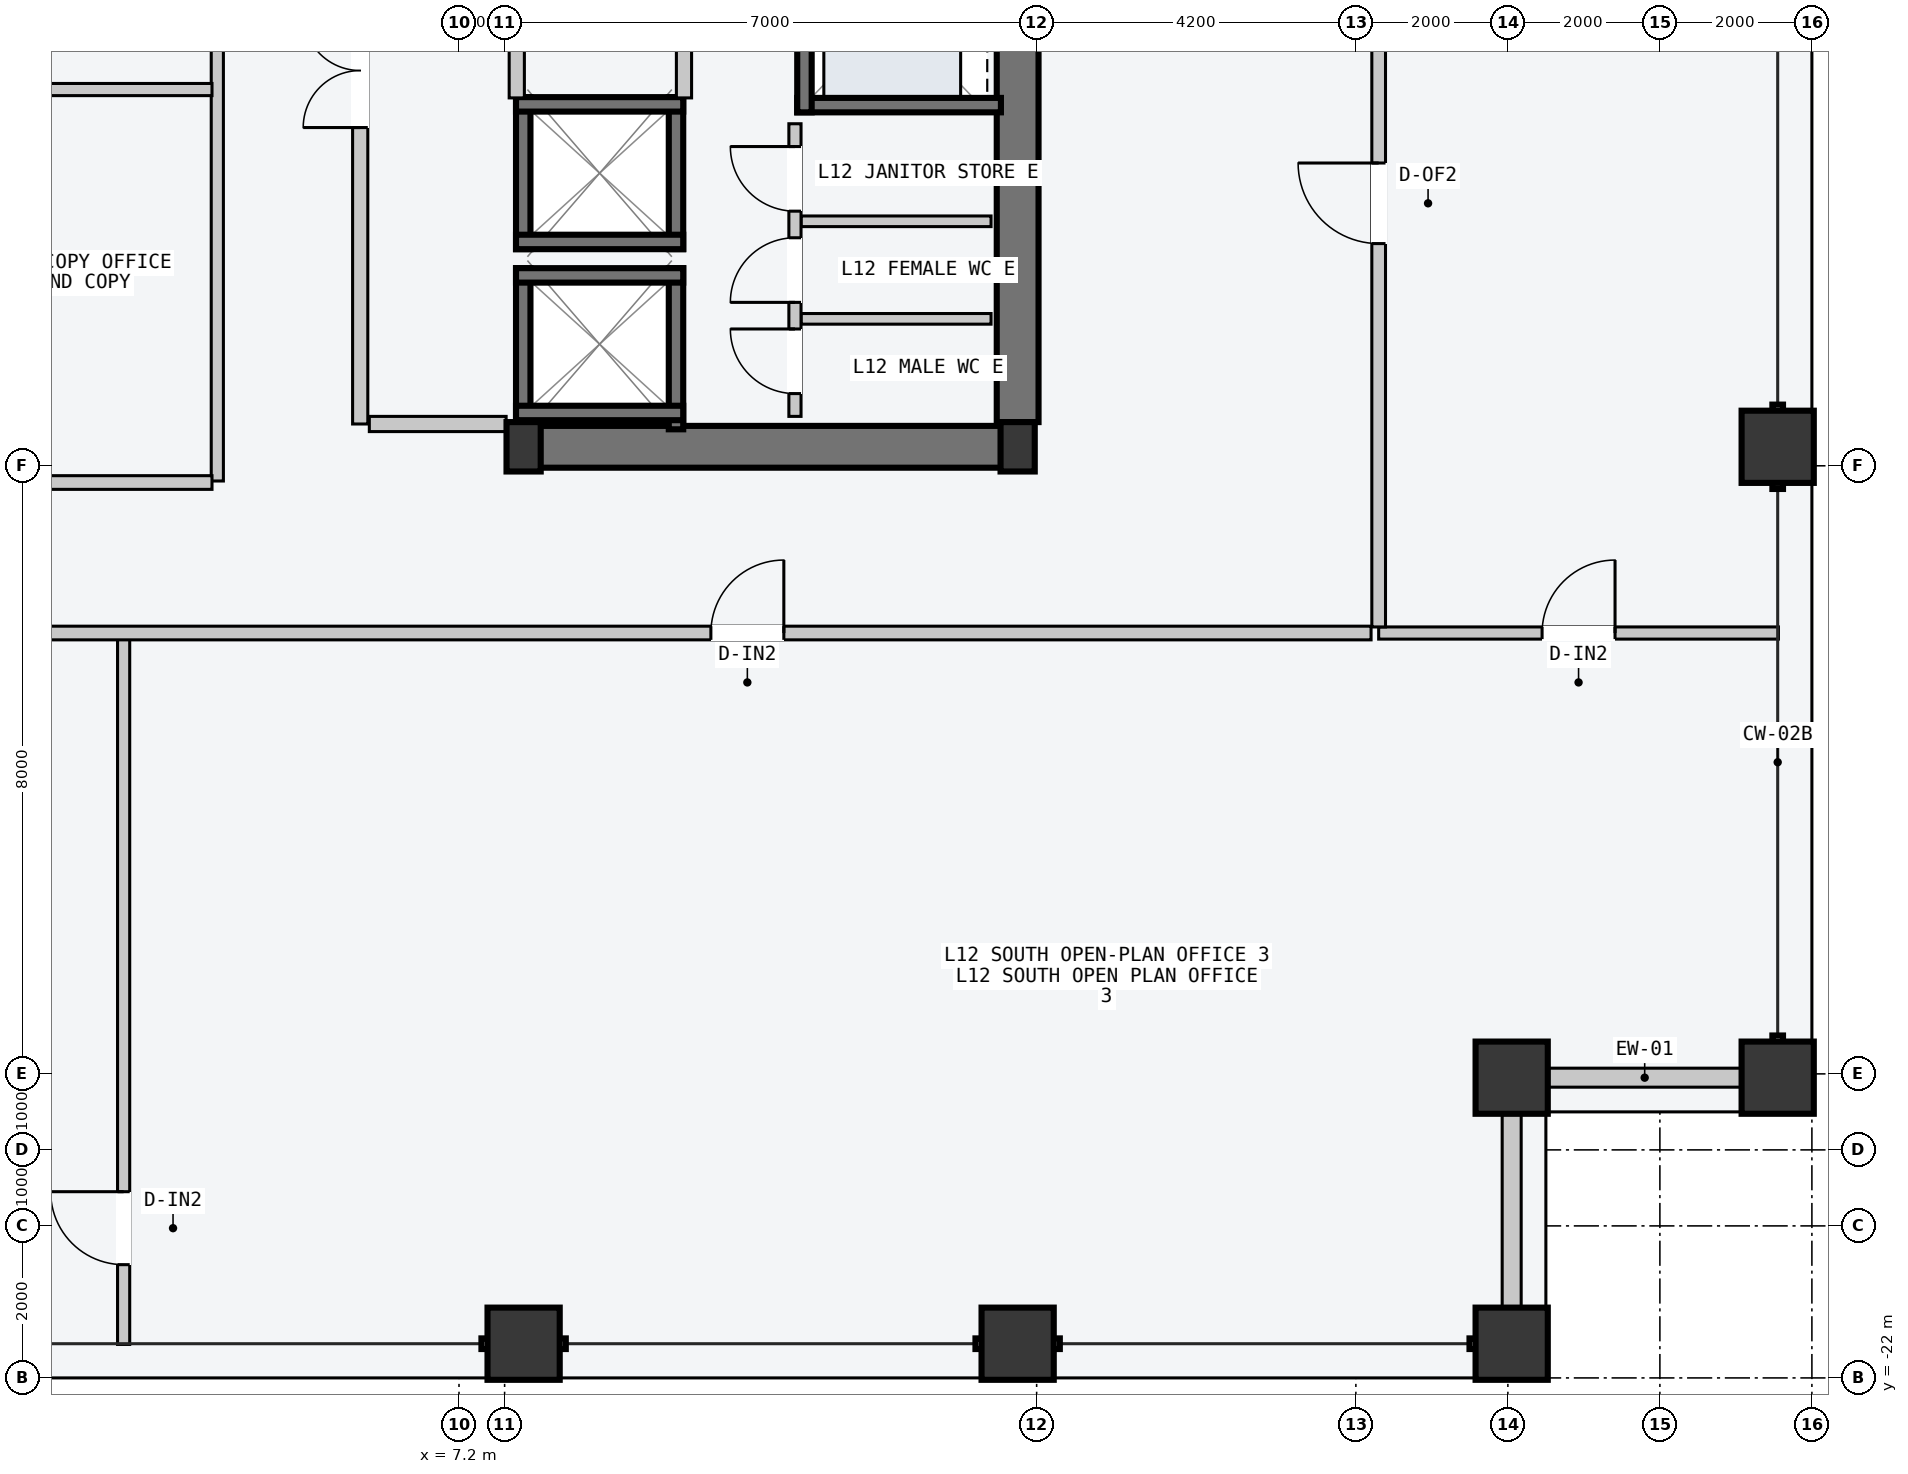
"""IFC4 building model, lengths in metres.
Left out: names, types, materials, properties, quantities, classifications, styles, units other than length and angle.
Written with IfcOpenShell. Run it as: python <this file> out.ifc"""

import sys

from ifc_helpers import new_model, si_unit, direction, frame, frame_2d, origin, origin_2d, place, context, subcontext, project, spatial, rectangle, hollow_rectangle, i_section, extrude, element, fill, save


model = new_model("IFC4")
c1 = context("Model", 3, precision=1e-05, world=origin(), true_north=direction((0.0, 1.0)))
c2 = subcontext(c1, "Body", "Model", "MODEL_VIEW")
j1 = project(units=[si_unit("LENGTHUNIT", "METRE"), si_unit("PLANEANGLEUNIT", "RADIAN")], contexts=[c1])
p1 = place(None, origin())
s1 = spatial("IfcSite", under=j1, at=p1, CompositionType="ELEMENT")
p2 = place(p1, origin())
s2 = spatial("IfcBuilding", under=s1, at=p2, CompositionType="ELEMENT")
p3 = place(p2, frame((0.0, 0.0, 49.2)))
s3 = spatial("IfcBuildingStorey", under=s2, at=p3, CompositionType="ELEMENT", Elevation=49.2)
p4 = place(p3, frame((8.07, -9.75, -0.2), z_axis=(0.0, 0.0, 1.0), x_axis=(1.0, 0.0, 0.0)))
e1 = element("IfcWall", 1, at=p4, inside=s3, PredefinedType="SHEAR", context=c2, shape_type="SweptSolid", body=[
    extrude(rectangle(XDim=6.46, YDim=0.55, at=frame_2d((3.23, 0.0))), origin(), (0.0, 0.0, 1.0), 3.6),
])
p5 = place(p3, frame((14.55, -9.425, -0.2), z_axis=(0.0, 0.0, 1.0), x_axis=(0.0, 1.0, 0.0)))
e2 = element("IfcWall", 2, at=p5, inside=s3, PredefinedType="SHEAR", context=c2, shape_type="SweptSolid", body=[
    extrude(rectangle(XDim=9.1, YDim=0.55, at=frame_2d((4.55, 0.0))), origin(), (0.0, 0.0, 1.0), 3.6),
])
for number, where, z_axis, x_axis in (
    (3, (8.05, -9.75, 0.0), (0.0, 0.0, 1.0), (1.0, 0.0, 0.0)),
    (4, (14.55, -9.75, 0.0), (0.0, 0.0, 1.0), (1.0, 0.0, 0.0)),
):
    element("IfcColumn", number, at=place(p3, frame(where, z_axis=z_axis, x_axis=x_axis)), inside=s3, PredefinedType="COLUMN", context=c2, shape_type="SweptSolid", body=[
        extrude(i_section(OverallWidth=0.45, OverallDepth=0.65, WebThickness=0.025, FlangeThickness=0.04, at=origin_2d()), origin(), (0.0, 0.0, 1.0), 3.6),
    ])
for number, where, z_axis, x_axis in (
    (5, (8.05, -21.55, 0.0), (0.0, 0.0, 1.0), (1.0, 0.0, 0.0)),
    (6, (14.55, -21.55, 0.0), (0.0, 0.0, 1.0), (1.0, 0.0, 0.0)),
    (7, (21.05, -21.55, 0.0), (0.0, 0.0, 1.0), (1.0, 0.0, 0.0)),
    (8, (24.55, -18.05, 0.0), (0.0, 0.0, 1.0), (0.0, 1.0, 0.0)),
    (9, (24.55, -9.75, 0.0), (0.0, 0.0, 1.0), (0.0, 1.0, 0.0)),
    (10, (21.05, -18.05, 0.0), (0.0, 0.0, 1.0), (1.0, 0.0, 0.0)),
):
    element("IfcColumn", number, at=place(p3, frame(where, z_axis=z_axis, x_axis=x_axis)), inside=s3, PredefinedType="COLUMN", context=c2, shape_type="SweptSolid", body=[
        extrude(hollow_rectangle(XDim=0.95, YDim=0.95, WallThickness=0.048, at=origin_2d()), origin(), (0.0, 0.0, 1.0), 3.6),
    ])
for number, where, z_axis, x_axis in (
    (11, (21.535, -18.05, 0.0), (0.0, 0.0, 1.0), (1.0, 0.0, 0.0)),
    (12, (21.05, -21.065, 0.0), (0.0, 0.0, 1.0), (0.0, 1.0, 0.0)),
):
    element("IfcWall", number, at=place(p3, frame(where, z_axis=z_axis, x_axis=x_axis)), inside=s3, PredefinedType="STANDARD", context=c2, shape_type="SweptSolid", body=[
        extrude(rectangle(XDim=2.53, YDim=0.25, at=frame_2d((1.265, 0.0))), origin(), (0.0, 0.0, 1.0), 2.7),
    ])
for number, where, z_axis, x_axis in (
    (13, (8.045, -9.52, -0.2), (0.0, 0.0, 1.0), (0.0, 1.0, 0.0)),
    (14, (10.055, -9.52, -0.2), (0.0, 0.0, 1.0), (0.0, 1.0, 0.0)),
):
    element("IfcWall", number, at=place(p3, frame(where, z_axis=z_axis, x_axis=x_axis)), inside=s3, PredefinedType="SOLIDWALL", context=c2, shape_type="SweptSolid", body=[
        extrude(rectangle(XDim=2.12, YDim=0.19, at=frame_2d((1.06, 0.0))), origin(), (0.0, 0.0, 1.0), 3.6),
    ])
for number, where, z_axis, x_axis in (
    (15, (7.95, -7.495, -0.2), (0.0, 0.0, 1.0), (1.0, 0.0, 0.0)),
    (16, (7.95, -9.305, -0.2), (0.0, 0.0, 1.0), (1.0, 0.0, 0.0)),
):
    element("IfcWall", number, at=place(p3, frame(where, z_axis=z_axis, x_axis=x_axis)), inside=s3, PredefinedType="SOLIDWALL", context=c2, shape_type="SweptSolid", body=[
        extrude(rectangle(XDim=2.2, YDim=0.19, at=frame_2d((1.1, 0.0))), origin(), (0.0, 0.0, 1.0), 3.6),
    ])
for number, where, z_axis, x_axis in (
    (17, (8.045, -7.15, -0.2), (0.0, 0.0, 1.0), (0.0, 1.0, 0.0)),
    (18, (10.055, -7.15, -0.2), (0.0, 0.0, 1.0), (0.0, 1.0, 0.0)),
):
    element("IfcWall", number, at=place(p3, frame(where, z_axis=z_axis, x_axis=x_axis)), inside=s3, PredefinedType="SOLIDWALL", context=c2, shape_type="SweptSolid", body=[
        extrude(rectangle(XDim=2.0, YDim=0.19, at=frame_2d((1.0, 0.0))), origin(), (0.0, 0.0, 1.0), 3.6),
    ])
for number, where, z_axis, x_axis in (
    (19, (7.95, -5.245, -0.2), (0.0, 0.0, 1.0), (1.0, 0.0, 0.0)),
    (20, (7.95, -7.055, -0.2), (0.0, 0.0, 1.0), (1.0, 0.0, 0.0)),
):
    element("IfcWall", number, at=place(p3, frame(where, z_axis=z_axis, x_axis=x_axis)), inside=s3, PredefinedType="SOLIDWALL", context=c2, shape_type="SweptSolid", body=[
        extrude(rectangle(XDim=2.2, YDim=0.19, at=frame_2d((1.1, 0.0))), origin(), (0.0, 0.0, 1.0), 3.6),
    ])
p6 = place(p3, frame((11.65, -5.255, -0.2), z_axis=(0.0, 0.0, 1.0), x_axis=(1.0, 0.0, 0.0)))
e21 = element("IfcWall", 21, at=p6, inside=s3, PredefinedType="SOLIDWALL", context=c2, shape_type="SweptSolid", body=[
    extrude(rectangle(XDim=2.68, YDim=0.19, at=frame_2d((1.34, 0.0))), origin(), (0.0, 0.0, 1.0), 3.6),
])
p7 = place(p3, frame((11.745, -5.35, -0.2), z_axis=(0.0, 0.0, 1.0), x_axis=(0.0, 1.0, 0.0)))
e22 = element("IfcWall", 22, at=p7, inside=s3, PredefinedType="SOLIDWALL", context=c2, shape_type="SweptSolid", body=[
    extrude(rectangle(XDim=2.6, YDim=0.19, at=frame_2d((1.3, 0.0))), origin(), (0.0, 0.0, 1.0), 3.6),
])
p8 = place(p3, frame((5.9, -9.45, 0.0), z_axis=(0.0, 0.0, 1.0), x_axis=(0.0, 1.0, 0.0)))
e23 = element("IfcWall", 23, at=p8, inside=s3, PredefinedType="PARTITIONING", context=c2, shape_type="SweptSolid", body=[
    extrude(rectangle(XDim=18.9, YDim=0.2, at=frame_2d((9.45, 0.0))), origin(), (0.0, 0.0, 1.0), 3.4),
])
p9 = place(p8, frame((3.9, 0.0, 0.0)))
e24 = element("IfcOpeningElement", 24, at=p9, cuts=e23, PredefinedType="OPENING", context=c2, shape_type="SweptSolid", body=[
    extrude(rectangle(XDim=1.5, YDim=2.2, at=frame_2d((0.75, 1.1))), frame((0.0, 0.11, 0.0), z_axis=(0.0, -1.0, 0.0), x_axis=(1.0, 0.0, 0.0)), (0.0, 0.0, 1.0), 0.22),
])
p10 = place(p3, frame((6.02, -9.45, 0.0), z_axis=(0.0, 0.0, 1.0), x_axis=(1.0, 0.0, 0.0)))
e25 = element("IfcWall", 25, at=p10, inside=s3, PredefinedType="PARTITIONING", context=c2, shape_type="SweptSolid", body=[
    extrude(rectangle(XDim=1.8, YDim=0.2, at=frame_2d((0.9, 0.0))), origin(), (0.0, 0.0, 1.0), 3.4),
])
for number, where, z_axis, x_axis in (
    (26, (7.96, -5.16, 0.0), (0.0, 0.0, 1.0), (0.0, 1.0, 0.0)),
    (27, (10.16, -5.16, 0.0), (0.0, 0.0, 1.0), (0.0, 1.0, 0.0)),
):
    element("IfcWall", number, at=place(p3, frame(where, z_axis=z_axis, x_axis=x_axis)), inside=s3, PredefinedType="PARTITIONING", context=c2, shape_type="SweptSolid", body=[
        extrude(rectangle(XDim=2.44, YDim=0.2, at=frame_2d((1.22, 0.0))), origin(), (0.0, 0.0, 1.0), 3.4),
    ])
for number, where, z_axis, x_axis in (
    (28, (11.7, -8.067, 0.0), (0.0, 0.0, 1.0), (1.0, 0.0, 0.0)),
    (29, (11.7, -6.783, 0.0), (0.0, 0.0, 1.0), (1.0, 0.0, 0.0)),
):
    element("IfcWall", number, at=place(p3, frame(where, z_axis=z_axis, x_axis=x_axis)), inside=s3, PredefinedType="PARTITIONING", context=c2, shape_type="SweptSolid", body=[
        extrude(rectangle(XDim=2.5, YDim=0.14, at=frame_2d((1.25, 0.0))), origin(), (0.0, 0.0, 1.0), 3.4),
    ])
p11 = place(p3, frame((11.62, -9.35, 0.0), z_axis=(0.0, 0.0, 1.0), x_axis=(0.0, 1.0, 0.0)))
e30 = element("IfcWall", 30, at=p11, inside=s3, PredefinedType="PARTITIONING", context=c2, shape_type="SweptSolid", body=[
    extrude(rectangle(XDim=3.85, YDim=0.16, at=frame_2d((1.925, 0.0))), origin(), (0.0, 0.0, 1.0), 3.4),
])
p12 = place(p11, frame((0.3, 0.0, 0.0)))
e31 = element("IfcOpeningElement", 31, at=p12, cuts=e30, PredefinedType="OPENING", context=c2, shape_type="SweptSolid", body=[
    extrude(rectangle(XDim=0.85, YDim=2.12, at=frame_2d((0.425, 1.06))), frame((0.0, 0.09, 0.0), z_axis=(0.0, -1.0, 0.0), x_axis=(1.0, 0.0, 0.0)), (0.0, 0.0, 1.0), 0.18),
])
p13 = place(p11, frame((1.5, 0.0, 0.0)))
e32 = element("IfcOpeningElement", 32, at=p13, cuts=e30, PredefinedType="OPENING", context=c2, shape_type="SweptSolid", body=[
    extrude(rectangle(XDim=0.85, YDim=2.12, at=frame_2d((0.425, 1.06))), frame((0.0, 0.09, 0.0), z_axis=(0.0, -1.0, 0.0), x_axis=(1.0, 0.0, 0.0)), (0.0, 0.0, 1.0), 0.18),
])
p14 = place(p11, frame((2.7, 0.0, 0.0)))
e33 = element("IfcOpeningElement", 33, at=p14, cuts=e30, PredefinedType="OPENING", context=c2, shape_type="SweptSolid", body=[
    extrude(rectangle(XDim=0.85, YDim=2.12, at=frame_2d((0.425, 1.06))), frame((0.0, 0.09, 0.0), z_axis=(0.0, -1.0, 0.0), x_axis=(1.0, 0.0, 0.0)), (0.0, 0.0, 1.0), 0.18),
])
p15 = place(p3, frame((4.02, -10.2, 0.0), z_axis=(0.0, 0.0, 1.0), x_axis=(0.0, 1.0, 0.0)))
e34 = element("IfcWall", 34, at=p15, inside=s3, PredefinedType="PARTITIONING", context=c2, shape_type="SweptSolid", body=[
    extrude(rectangle(XDim=22.7, YDim=0.16, at=frame_2d((11.35, 0.0))), origin(), (0.0, 0.0, 1.0), 3.4),
])
p16 = place(p3, frame((-3.95, -10.22, 0.0), z_axis=(0.0, 0.0, 1.0), x_axis=(1.0, 0.0, 0.0)))
e35 = element("IfcWall", 35, at=p16, inside=s3, PredefinedType="PARTITIONING", context=c2, shape_type="SweptSolid", body=[
    extrude(rectangle(XDim=7.9, YDim=0.18, at=frame_2d((3.95, 0.0))), origin(), (0.0, 0.0, 1.0), 3.4),
])
p17 = place(p16, frame((1.35, 0.0, 0.0)))
e36 = element("IfcOpeningElement", 36, at=p17, cuts=e35, PredefinedType="OPENING", context=c2, shape_type="SweptSolid", body=[
    extrude(rectangle(XDim=0.96, YDim=2.18, at=frame_2d((0.48, 1.09))), frame((0.0, 0.1, 0.0), z_axis=(0.0, -1.0, 0.0), x_axis=(1.0, 0.0, 0.0)), (0.0, 0.0, 1.0), 0.2),
])
p18 = place(p3, frame((-3.95, -5.05, 0.0), z_axis=(0.0, 0.0, 1.0), x_axis=(1.0, 0.0, 0.0)))
e37 = element("IfcWall", 37, at=p18, inside=s3, PredefinedType="PARTITIONING", context=c2, shape_type="SweptSolid", body=[
    extrude(rectangle(XDim=7.9, YDim=0.16, at=frame_2d((3.95, 0.0))), origin(), (0.0, 0.0, 1.0), 3.4),
])
p19 = place(p18, frame((1.35, 0.0, 0.0)))
e38 = element("IfcOpeningElement", 38, at=p19, cuts=e37, PredefinedType="OPENING", context=c2, shape_type="SweptSolid", body=[
    extrude(rectangle(XDim=0.9, YDim=2.15, at=frame_2d((0.45, 1.075))), frame((0.0, 0.09, 0.0), z_axis=(0.0, -1.0, 0.0), x_axis=(1.0, 0.0, 0.0)), (0.0, 0.0, 1.0), 0.18),
])
p20 = place(p3, frame((2.787, -21.56, 0.0), z_axis=(0.0, 0.0, 1.0), x_axis=(0.0, 1.0, 0.0)))
e39 = element("IfcWall", 39, at=p20, inside=s3, PredefinedType="PARTITIONING", context=c2, shape_type="SweptSolid", body=[
    extrude(rectangle(XDim=9.3, YDim=0.16, at=frame_2d((4.65, 0.0))), origin(), (0.0, 0.0, 1.0), 3.4),
])
p21 = place(p20, frame((1.05, 0.0, 0.0)))
e40 = element("IfcOpeningElement", 40, at=p21, cuts=e39, PredefinedType="OPENING", context=c2, shape_type="SweptSolid", body=[
    extrude(rectangle(XDim=0.96, YDim=2.18, at=frame_2d((0.48, 1.09))), frame((0.0, 0.09, 0.0), z_axis=(0.0, -1.0, 0.0), x_axis=(1.0, 0.0, 0.0)), (0.0, 0.0, 1.0), 0.18),
])
p22 = place(p3, frame((-19.2, -12.2, 0.0), z_axis=(0.0, 0.0, 1.0), x_axis=(1.0, 0.0, 0.0)))
e41 = element("IfcWall", 41, at=p22, inside=s3, PredefinedType="PARTITIONING", context=c2, shape_type="SweptSolid", body=[
    extrude(rectangle(XDim=38.4, YDim=0.18, at=frame_2d((19.2, 0.0))), origin(), (0.0, 0.0, 1.0), 3.4),
])
p23 = place(p22, frame((3.524, 0.0, 0.0)))
e42 = element("IfcOpeningElement", 42, at=p23, cuts=e41, PredefinedType="OPENING", context=c2, shape_type="SweptSolid", body=[
    extrude(rectangle(XDim=1.4, YDim=2.2, at=frame_2d((0.7, 1.1))), frame((0.0, 0.1, 0.0), z_axis=(0.0, -1.0, 0.0), x_axis=(1.0, 0.0, 0.0)), (0.0, 0.0, 1.0), 0.2),
])
p24 = place(p22, frame((14.768, 0.0, 0.0)))
e43 = element("IfcOpeningElement", 43, at=p24, cuts=e41, PredefinedType="OPENING", context=c2, shape_type="SweptSolid", body=[
    extrude(rectangle(XDim=0.9, YDim=2.15, at=frame_2d((0.45, 1.075))), frame((0.0, 0.1, 0.0), z_axis=(0.0, -1.0, 0.0), x_axis=(1.0, 0.0, 0.0)), (0.0, 0.0, 1.0), 0.2),
])
p25 = place(p22, frame((29.714, 0.0, 0.0)))
e44 = element("IfcOpeningElement", 44, at=p25, cuts=e41, PredefinedType="OPENING", context=c2, shape_type="SweptSolid", body=[
    extrude(rectangle(XDim=0.96, YDim=2.18, at=frame_2d((0.48, 1.09))), frame((0.0, 0.1, 0.0), z_axis=(0.0, -1.0, 0.0), x_axis=(1.0, 0.0, 0.0)), (0.0, 0.0, 1.0), 0.2),
])
p26 = place(p3, frame((19.3, -12.2, 0.0), z_axis=(0.0, 0.0, 1.0), x_axis=(1.0, 0.0, 0.0)))
e45 = element("IfcWall", 45, at=p26, inside=s3, PredefinedType="PARTITIONING", context=c2, shape_type="SweptSolid", body=[
    extrude(rectangle(XDim=5.26, YDim=0.16, at=frame_2d((2.63, 0.0))), origin(), (0.0, 0.0, 1.0), 3.4),
])
p27 = place(p26, frame((2.15, 0.0, 0.0)))
e46 = element("IfcOpeningElement", 46, at=p27, cuts=e45, PredefinedType="OPENING", context=c2, shape_type="SweptSolid", body=[
    extrude(rectangle(XDim=0.96, YDim=2.18, at=frame_2d((0.48, 1.09))), frame((0.0, 0.09, 0.0), z_axis=(0.0, -1.0, 0.0), x_axis=(1.0, 0.0, 0.0)), (0.0, 0.0, 1.0), 0.18),
])
p28 = place(p3, frame((19.3, -12.12, 0.0), z_axis=(0.0, 0.0, 1.0), x_axis=(0.0, 1.0, 0.0)))
e47 = element("IfcWall", 47, at=p28, inside=s3, PredefinedType="PARTITIONING", context=c2, shape_type="SweptSolid", body=[
    extrude(rectangle(XDim=26.54, YDim=0.18, at=frame_2d((13.27, 0.0))), origin(), (0.0, 0.0, 1.0), 3.4),
])
p29 = place(p28, frame((5.043, 0.0, 0.0)))
e48 = element("IfcOpeningElement", 48, at=p29, cuts=e47, PredefinedType="OPENING", context=c2, shape_type="SweptSolid", body=[
    extrude(rectangle(XDim=1.06, YDim=2.2, at=frame_2d((0.53, 1.1))), frame((0.0, 0.1, 0.0), z_axis=(0.0, -1.0, 0.0), x_axis=(1.0, 0.0, 0.0)), (0.0, 0.0, 1.0), 0.2),
])
p30 = place(p28, frame((18.223, 0.0, 0.0)))
e49 = element("IfcOpeningElement", 49, at=p30, cuts=e47, PredefinedType="OPENING", context=c2, shape_type="SweptSolid", body=[
    extrude(rectangle(XDim=1.24, YDim=2.24, at=frame_2d((0.62, 1.12))), frame((0.0, 0.1, 0.0), z_axis=(0.0, -1.0, 0.0), x_axis=(1.0, 0.0, 0.0)), (0.0, 0.0, 1.0), 0.2),
])
p31 = place(p9, origin())
e50 = element("IfcDoor", 50, at=p31, inside=s3, OperationType="DOUBLE_DOOR_SINGLE_SWING", PredefinedType="DOOR", context=c2, shape_type="SweptSolid", body=[
    extrude(rectangle(XDim=1.5, YDim=2.2, at=frame_2d((0.75, 1.1))), frame((0.0, 0.025, 0.0), z_axis=(0.0, -1.0, 0.0), x_axis=(1.0, 0.0, 0.0)), (0.0, 0.0, 1.0), 0.05),
])
fill(e24, e50)
p32 = place(p12, origin())
e51 = element("IfcDoor", 51, at=p32, inside=s3, OperationType="SINGLE_SWING_RIGHT", PredefinedType="DOOR", context=c2, shape_type="SweptSolid", body=[
    extrude(rectangle(XDim=0.85, YDim=2.12, at=frame_2d((0.425, 1.06))), frame((0.0, 0.025, 0.0), z_axis=(0.0, -1.0, 0.0), x_axis=(1.0, 0.0, 0.0)), (0.0, 0.0, 1.0), 0.05),
])
fill(e31, e51)
p33 = place(p13, origin())
e52 = element("IfcDoor", 52, at=p33, inside=s3, OperationType="SINGLE_SWING_LEFT", PredefinedType="DOOR", context=c2, shape_type="SweptSolid", body=[
    extrude(rectangle(XDim=0.85, YDim=2.12, at=frame_2d((0.425, 1.06))), frame((0.0, 0.025, 0.0), z_axis=(0.0, -1.0, 0.0), x_axis=(1.0, 0.0, 0.0)), (0.0, 0.0, 1.0), 0.05),
])
fill(e32, e52)
p34 = place(p14, origin())
e53 = element("IfcDoor", 53, at=p34, inside=s3, OperationType="SINGLE_SWING_RIGHT", PredefinedType="DOOR", context=c2, shape_type="SweptSolid", body=[
    extrude(rectangle(XDim=0.85, YDim=2.12, at=frame_2d((0.425, 1.06))), frame((0.0, 0.025, 0.0), z_axis=(0.0, -1.0, 0.0), x_axis=(1.0, 0.0, 0.0)), (0.0, 0.0, 1.0), 0.05),
])
fill(e33, e53)
p35 = place(p21, origin())
e54 = element("IfcDoor", 54, at=p35, inside=s3, OperationType="SINGLE_SWING_RIGHT", PredefinedType="DOOR", context=c2, shape_type="SweptSolid", body=[
    extrude(rectangle(XDim=0.96, YDim=2.18, at=frame_2d((0.48, 1.09))), frame((0.0, 0.025, 0.0), z_axis=(0.0, -1.0, 0.0), x_axis=(1.0, 0.0, 0.0)), (0.0, 0.0, 1.0), 0.05),
])
fill(e40, e54)
p36 = place(p25, origin())
e55 = element("IfcDoor", 55, at=p36, inside=s3, OperationType="SINGLE_SWING_RIGHT", PredefinedType="DOOR", context=c2, shape_type="SweptSolid", body=[
    extrude(rectangle(XDim=0.96, YDim=2.18, at=frame_2d((0.48, 1.09))), frame((0.0, 0.025, 0.0), z_axis=(0.0, -1.0, 0.0), x_axis=(1.0, 0.0, 0.0)), (0.0, 0.0, 1.0), 0.05),
])
fill(e44, e55)
p37 = place(p27, origin())
e56 = element("IfcDoor", 56, at=p37, inside=s3, OperationType="SINGLE_SWING_RIGHT", PredefinedType="DOOR", context=c2, shape_type="SweptSolid", body=[
    extrude(rectangle(XDim=0.96, YDim=2.18, at=frame_2d((0.48, 1.09))), frame((0.0, 0.025, 0.0), z_axis=(0.0, -1.0, 0.0), x_axis=(1.0, 0.0, 0.0)), (0.0, 0.0, 1.0), 0.05),
])
fill(e46, e56)
p38 = place(p29, origin())
e57 = element("IfcDoor", 57, at=p38, inside=s3, OperationType="SINGLE_SWING_RIGHT", PredefinedType="DOOR", context=c2, shape_type="SweptSolid", body=[
    extrude(rectangle(XDim=1.06, YDim=2.2, at=frame_2d((0.53, 1.1))), frame((0.0, 0.025, 0.0), z_axis=(0.0, -1.0, 0.0), x_axis=(1.0, 0.0, 0.0)), (0.0, 0.0, 1.0), 0.05),
])
fill(e48, e57)
save(model, sys.argv[1])
